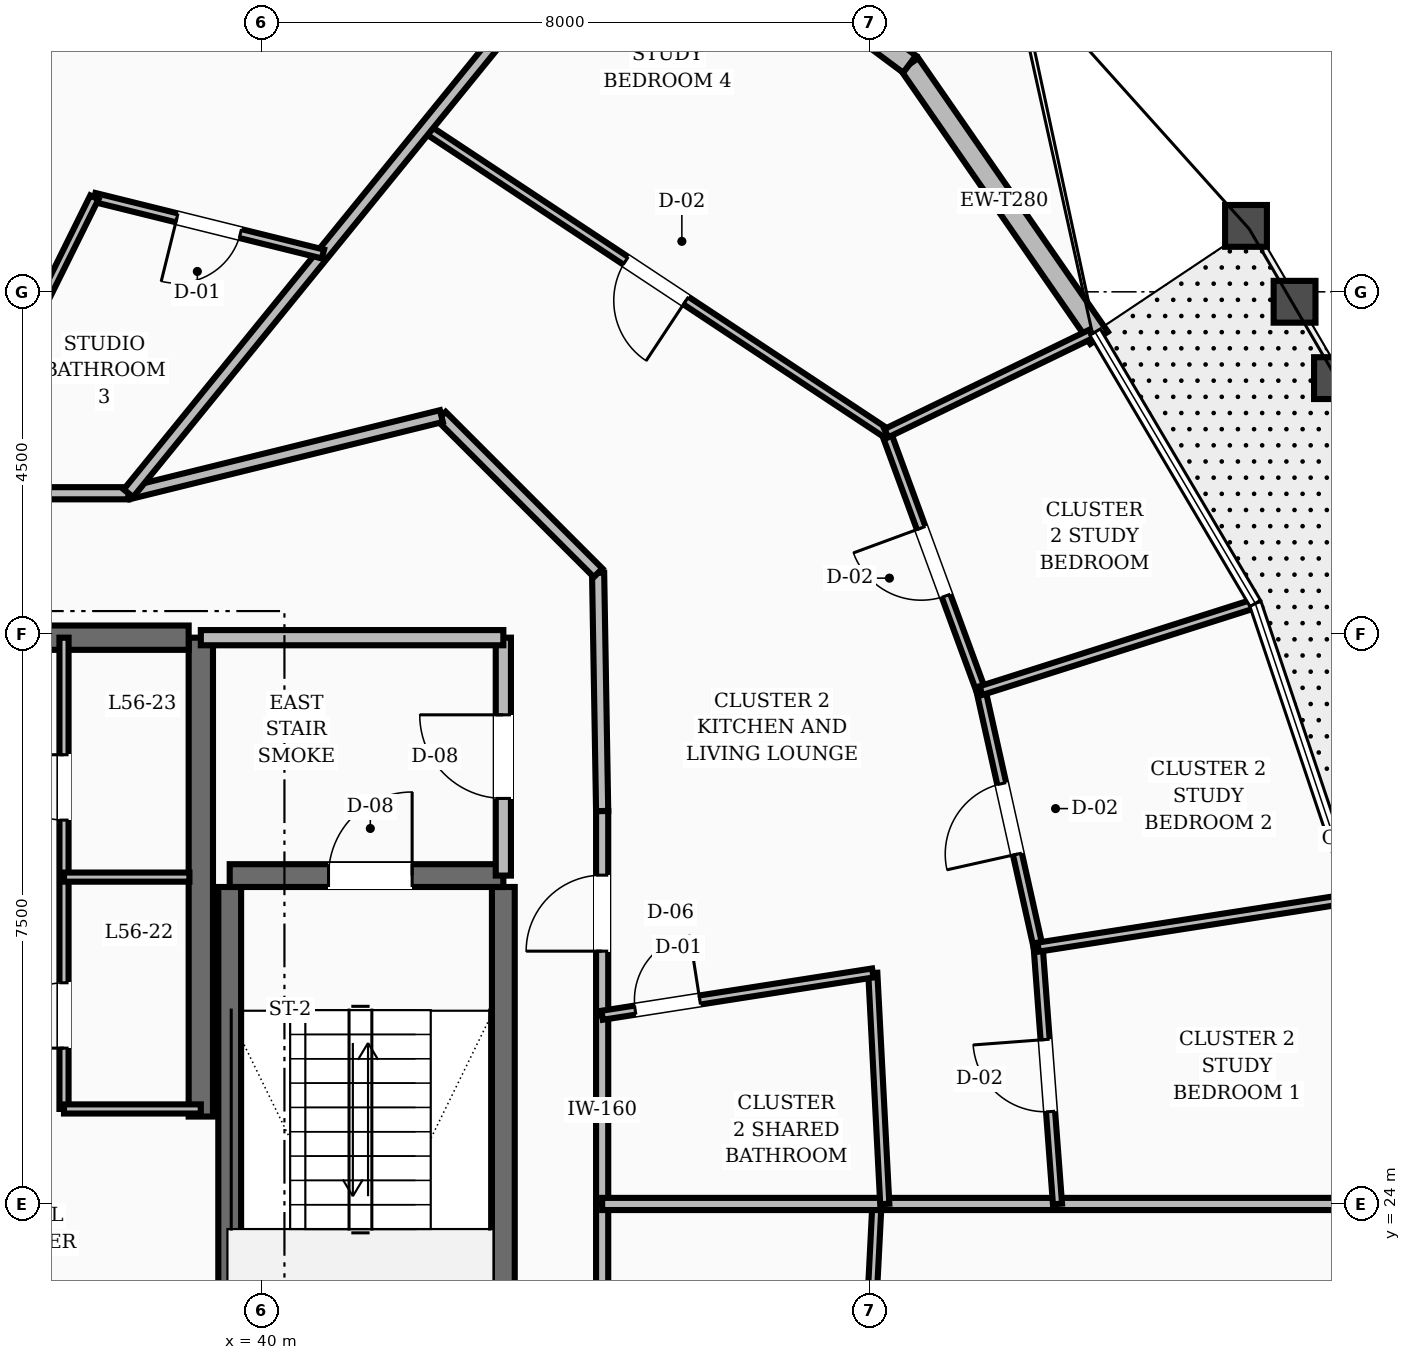
"""IFC4 building model, lengths in metres.
Left out: names, types, materials, properties, quantities, classifications, styles, units other than length and angle.
Written with IfcOpenShell. Run it as: python <this file> out.ifc"""

import sys

from ifc_helpers import new_model, si_unit, direction, frame, frame_2d, origin, place, context, subcontext, project, spatial, rectangle, extrude, element, fill, save


model = new_model("IFC4")
c1 = context("Model", 3, precision=1e-05, world=origin(), true_north=direction((0.0, 1.0)))
c2 = subcontext(c1, "Body", "Model", "MODEL_VIEW")
j1 = project(units=[si_unit("LENGTHUNIT", "METRE"), si_unit("PLANEANGLEUNIT", "RADIAN")], contexts=[c1])
p1 = place(None, origin())
s1 = spatial("IfcSite", under=j1, at=p1, CompositionType="ELEMENT")
p2 = place(p1, origin())
s2 = spatial("IfcBuilding", under=s1, at=p2, CompositionType="ELEMENT")
p3 = place(p2, frame((0.0, 0.0, 218.4)))
s3 = spatial("IfcBuildingStorey", under=s2, at=p3, CompositionType="ELEMENT", Elevation=218.4)
p4 = place(p3, frame((39.2, 25.15, 0.0), z_axis=(0.0, 0.0, 1.0), x_axis=(0.0, 1.0, 0.0)))
e1 = element("IfcWall", 1, at=p4, inside=s3, PredefinedType="SHEAR", context=c2, shape_type="SweptSolid", body=[
    extrude(rectangle(XDim=6.3, YDim=0.32, at=frame_2d((3.15, 0.0))), origin(), (0.0, 0.0, 1.0), 3.6),
])
p5 = place(p3, frame((35.8, 31.45, 0.0), z_axis=(0.0, 0.0, 1.0), x_axis=(1.0, 0.0, 0.0)))
e2 = element("IfcWall", 2, at=p5, inside=s3, PredefinedType="SHEAR", context=c2, shape_type="SweptSolid", body=[
    extrude(rectangle(XDim=3.24, YDim=0.32, at=frame_2d((1.62, 0.0))), origin(), (0.0, 0.0, 1.0), 3.6),
])
p6 = place(p5, frame((0.3, 0.0, 0.0)))
e3 = element("IfcOpeningElement", 3, at=p6, cuts=e2, PredefinedType="OPENING", context=c2, shape_type="SweptSolid", body=[
    extrude(rectangle(XDim=1.1, YDim=2.1, at=frame_2d((0.55, 1.05))), frame((0.0, 0.17, 0.0), z_axis=(0.0, -1.0, 0.0), x_axis=(1.0, 0.0, 0.0)), (0.0, 0.0, 1.0), 0.34),
])
for number, where, z_axis, x_axis in (
    (4, (43.18, 19.43, 0.0), (0.0, 0.0, 1.0), (0.0, 1.0, 0.0)),
    (5, (39.58, 19.43, 0.0), (0.0, 0.0, 1.0), (0.0, 1.0, 0.0)),
):
    element("IfcWall", number, at=place(p3, frame(where, z_axis=z_axis, x_axis=x_axis)), inside=s3, PredefinedType="SHEAR", context=c2, shape_type="SweptSolid", body=[
        extrude(rectangle(XDim=8.74, YDim=0.3, at=frame_2d((4.37, 0.0))), origin(), (0.0, 0.0, 1.0), 3.6),
    ])
p7 = place(p3, frame((39.58, 28.32, 0.0), z_axis=(0.0, 0.0, 1.0), x_axis=(1.0, 0.0, 0.0)))
e6 = element("IfcWall", 6, at=p7, inside=s3, PredefinedType="SHEAR", context=c2, shape_type="SweptSolid", body=[
    extrude(rectangle(XDim=3.6, YDim=0.3, at=frame_2d((1.8, 0.0))), origin(), (0.0, 0.0, 1.0), 3.6),
])
p8 = place(p7, frame((1.3, 0.0, 0.0)))
e7 = element("IfcOpeningElement", 7, at=p8, cuts=e6, PredefinedType="OPENING", context=c2, shape_type="SweptSolid", body=[
    extrude(rectangle(XDim=1.1, YDim=2.1, at=frame_2d((0.55, 1.05))), frame((0.0, 0.16, 0.0), z_axis=(0.0, -1.0, 0.0), x_axis=(1.0, 0.0, 0.0)), (0.0, 0.0, 1.0), 0.32),
])
p9 = place(p3, frame((51.017, 35.395, 0.0), z_axis=(0.0, 0.0, 1.0), x_axis=(-0.569267957894, 0.822152049267, 0.0)))
e8 = element("IfcWall", 8, at=p9, inside=s3, PredefinedType="STANDARD", context=c2, shape_type="SweptSolid", body=[
    extrude(rectangle(XDim=4.379, YDim=0.28, at=frame_2d((2.189, 0.0))), origin(), (0.0, 0.0, 1.0), 2.88),
])
p10 = place(p3, frame((48.524, 38.995, 0.0), z_axis=(0.0, 0.0, 1.0), x_axis=(-0.802005914902, 0.597316090912, 0.0)))
e9 = element("IfcWall", 9, at=p10, inside=s3, PredefinedType="STANDARD", context=c2, shape_type="SweptSolid", body=[
    extrude(rectangle(XDim=4.416, YDim=0.28, at=frame_2d((2.208, 0.0))), origin(), (0.0, 0.0, 1.0), 2.88),
])
p11 = place(p10, frame((0.608, 0.0, 0.8)))
e10 = element("IfcOpeningElement", 10, at=p11, cuts=e9, PredefinedType="OPENING", context=c2, shape_type="SweptSolid", body=[
    extrude(rectangle(XDim=3.2, YDim=1.65, at=frame_2d((1.6, 0.825))), frame((0.0, 0.15, 0.0), z_axis=(0.0, -1.0, 0.0), x_axis=(1.0, 0.0, 0.0)), (0.0, 0.0, 1.0), 0.3),
])
p12 = place(p3, frame((43.18, 28.32, 0.0), z_axis=(0.0, 0.0, 1.0), x_axis=(0.0, 1.0, 0.0)))
e11 = element("IfcWall", 11, at=p12, inside=s3, PredefinedType="SOLIDWALL", context=c2, shape_type="SweptSolid", body=[
    extrude(rectangle(XDim=3.13, YDim=0.2, at=frame_2d((1.565, 0.0))), origin(), (0.0, 0.0, 1.0), 2.87),
])
p13 = place(p12, frame((1.015, 0.0, 0.0)))
e12 = element("IfcOpeningElement", 12, at=p13, cuts=e11, PredefinedType="OPENING", context=c2, shape_type="SweptSolid", body=[
    extrude(rectangle(XDim=1.1, YDim=2.1, at=frame_2d((0.55, 1.05))), frame((0.0, 0.11, 0.0), z_axis=(0.0, -1.0, 0.0), x_axis=(1.0, 0.0, 0.0)), (0.0, 0.0, 1.0), 0.22),
])
p14 = place(p3, frame((39.2, 31.45, 0.0), z_axis=(0.0, 0.0, 1.0), x_axis=(1.0, 0.0, 0.0)))
e13 = element("IfcWall", 13, at=p14, inside=s3, PredefinedType="SOLIDWALL", context=c2, shape_type="SweptSolid", body=[
    extrude(rectangle(XDim=3.98, YDim=0.2, at=frame_2d((1.99, 0.0))), origin(), (0.0, 0.0, 1.0), 2.87),
])
p15 = place(p3, frame((37.4, 25.25, 0.0), z_axis=(0.0, 0.0, 1.0), x_axis=(0.0, 1.0, 0.0)))
e14 = element("IfcWall", 14, at=p15, inside=s3, PredefinedType="PARTITIONING", context=c2, shape_type="SweptSolid", body=[
    extrude(rectangle(XDim=6.2, YDim=0.12, at=frame_2d((3.1, 0.0))), origin(), (0.0, 0.0, 1.0), 2.87),
])
p16 = place(p15, frame((0.8, 0.0, 0.0)))
e15 = element("IfcOpeningElement", 15, at=p16, cuts=e14, PredefinedType="OPENING", context=c2, shape_type="SweptSolid", body=[
    extrude(rectangle(XDim=0.86, YDim=2.1, at=frame_2d((0.43, 1.05))), frame((0.0, 0.07, 0.0), z_axis=(0.0, -1.0, 0.0), x_axis=(1.0, 0.0, 0.0)), (0.0, 0.0, 1.0), 0.14),
])
p17 = place(p15, frame((3.8, 0.0, 0.0)))
e16 = element("IfcOpeningElement", 16, at=p17, cuts=e14, PredefinedType="OPENING", context=c2, shape_type="SweptSolid", body=[
    extrude(rectangle(XDim=0.86, YDim=2.1, at=frame_2d((0.43, 1.05))), frame((0.0, 0.07, 0.0), z_axis=(0.0, -1.0, 0.0), x_axis=(1.0, 0.0, 0.0)), (0.0, 0.0, 1.0), 0.14),
])
p18 = place(p3, frame((37.4, 25.25, 0.0), z_axis=(0.0, 0.0, 1.0), x_axis=(1.0, 0.0, 0.0)))
e17 = element("IfcWall", 17, at=p18, inside=s3, PredefinedType="PARTITIONING", context=c2, shape_type="SweptSolid", body=[
    extrude(rectangle(XDim=1.8, YDim=0.12, at=frame_2d((0.9, 0.0))), origin(), (0.0, 0.0, 1.0), 2.87),
])
p19 = place(p3, frame((37.4, 28.3, 0.0), z_axis=(0.0, 0.0, 1.0), x_axis=(1.0, 0.0, 0.0)))
e18 = element("IfcWall", 18, at=p19, inside=s3, PredefinedType="PARTITIONING", context=c2, shape_type="SweptSolid", body=[
    extrude(rectangle(XDim=1.65, YDim=0.12, at=frame_2d((0.825, 0.0))), origin(), (0.0, 0.0, 1.0), 2.87),
])
p20 = place(p3, frame((44.48, 24.0, 0.0), z_axis=(0.0, 0.0, 1.0), x_axis=(0.0, 1.0, 0.0)))
e19 = element("IfcWall", 19, at=p20, inside=s3, PredefinedType="SOLIDWALL", context=c2, shape_type="SweptSolid", body=[
    extrude(rectangle(XDim=2.482, YDim=0.16, at=frame_2d((1.241, 0.0))), origin(), (0.0, 0.0, 1.0), 2.87),
])
p21 = place(p3, frame((44.48, 26.482, 0.0), z_axis=(0.0, 0.0, 1.0), x_axis=(0.0, 1.0, 0.0)))
e20 = element("IfcWall", 20, at=p21, inside=s3, PredefinedType="SOLIDWALL", context=c2, shape_type="SweptSolid", body=[
    extrude(rectangle(XDim=2.687, YDim=0.16, at=frame_2d((1.344, 0.0))), origin(), (0.0, 0.0, 1.0), 2.87),
])
p22 = place(p21, frame((0.844, 0.0, 0.0)))
e21 = element("IfcOpeningElement", 21, at=p22, cuts=e20, PredefinedType="OPENING", context=c2, shape_type="SweptSolid", body=[
    extrude(rectangle(XDim=1.0, YDim=2.1, at=frame_2d((0.5, 1.05))), frame((0.0, 0.09, 0.0), z_axis=(0.0, -1.0, 0.0), x_axis=(1.0, 0.0, 0.0)), (0.0, 0.0, 1.0), 0.18),
])
p23 = place(p3, frame((44.48, 29.169, 0.0), z_axis=(0.0, 0.0, 1.0), x_axis=(-0.016981035134, 0.999855811828, 0.0)))
e22 = element("IfcWall", 22, at=p23, inside=s3, PredefinedType="SOLIDWALL", context=c2, shape_type="SweptSolid", body=[
    extrude(rectangle(XDim=3.134, YDim=0.16, at=frame_2d((1.567, 0.0))), origin(), (0.0, 0.0, 1.0), 2.87),
])
p24 = place(p3, frame((44.427, 32.303, 0.0), z_axis=(0.0, 0.0, 1.0), x_axis=(-0.707106781187, 0.707106781187, 0.0)))
e23 = element("IfcWall", 23, at=p24, inside=s3, PredefinedType="SOLIDWALL", context=c2, shape_type="SweptSolid", body=[
    extrude(rectangle(XDim=2.916, YDim=0.16, at=frame_2d((1.458, 0.0))), origin(), (0.0, 0.0, 1.0), 2.87),
])
p25 = place(p3, frame((42.365, 34.365, 0.0), z_axis=(0.0, 0.0, 1.0), x_axis=(-0.970939799552, -0.239323850978, 0.0)))
e24 = element("IfcWall", 24, at=p25, inside=s3, PredefinedType="SOLIDWALL", context=c2, shape_type="SweptSolid", body=[
    extrude(rectangle(XDim=4.241, YDim=0.16, at=frame_2d((2.12, 0.0))), origin(), (0.0, 0.0, 1.0), 2.87),
])
p26 = place(p3, frame((38.248, 33.35, 0.0), z_axis=(0.0, 0.0, 1.0), x_axis=(-1.0, 0.0, 0.0)))
e25 = element("IfcWall", 25, at=p26, inside=s3, PredefinedType="SOLIDWALL", context=c2, shape_type="SweptSolid", body=[
    extrude(rectangle(XDim=2.375, YDim=0.16, at=frame_2d((1.188, 0.0))), origin(), (0.0, 0.0, 1.0), 2.87),
])
p27 = place(p3, frame((44.48, 21.518, 0.0), z_axis=(0.0, 0.0, 1.0), x_axis=(0.0, 1.0, 0.0)))
e26 = element("IfcWall", 26, at=p27, inside=s3, PredefinedType="SOLIDWALL", context=c2, shape_type="SweptSolid", body=[
    extrude(rectangle(XDim=2.482, YDim=0.16, at=frame_2d((1.241, 0.0))), origin(), (0.0, 0.0, 1.0), 2.87),
])
p28 = place(p3, frame((47.942, 20.977, 0.0), z_axis=(0.0, 0.0, 1.0), x_axis=(0.050645517022, 0.998716692364, 0.0)))
e27 = element("IfcWall", 27, at=p28, inside=s3, PredefinedType="PARTITIONING", context=c2, shape_type="SweptSolid", body=[
    extrude(rectangle(XDim=3.027, YDim=0.12, at=frame_2d((1.514, 0.0))), origin(), (0.0, 0.0, 1.0), 2.87),
])
p29 = place(p3, frame((44.48, 24.0, 0.0), z_axis=(0.0, 0.0, 1.0), x_axis=(1.0, 0.0, 0.0)))
e28 = element("IfcWall", 28, at=p29, inside=s3, PredefinedType="SOLIDWALL", context=c2, shape_type="SweptSolid", body=[
    extrude(rectangle(XDim=10.279, YDim=0.16, at=frame_2d((5.139, 0.0))), origin(), (0.0, 0.0, 1.0), 2.87),
])
p30 = place(p3, frame((48.198, 24.0, 0.0), z_axis=(0.0, 0.0, 1.0), x_axis=(-0.051830297727, 0.998655906826, 0.0)))
e29 = element("IfcWall", 29, at=p30, inside=s3, PredefinedType="PARTITIONING", context=c2, shape_type="SweptSolid", body=[
    extrude(rectangle(XDim=3.043, YDim=0.12, at=frame_2d((1.521, 0.0))), origin(), (0.0, 0.0, 1.0), 2.87),
])
p31 = place(p3, frame((44.48, 26.482, 0.0), z_axis=(0.0, 0.0, 1.0), x_axis=(0.988009450348, 0.154393413147, 0.0)))
e30 = element("IfcWall", 30, at=p31, inside=s3, PredefinedType="PARTITIONING", context=c2, shape_type="SweptSolid", body=[
    extrude(rectangle(XDim=3.604, YDim=0.12, at=frame_2d((1.802, 0.0))), origin(), (0.0, 0.0, 1.0), 2.87),
])
p32 = place(p31, frame((0.44, 0.0, 0.0)))
e31 = element("IfcOpeningElement", 31, at=p32, cuts=e30, PredefinedType="OPENING", context=c2, shape_type="SweptSolid", body=[
    extrude(rectangle(XDim=0.86, YDim=2.1, at=frame_2d((0.43, 1.05))), frame((0.0, 0.07, 0.0), z_axis=(0.0, -1.0, 0.0), x_axis=(1.0, 0.0, 0.0)), (0.0, 0.0, 1.0), 0.14),
])
p33 = place(p3, frame((50.471, 24.0, 0.0), z_axis=(0.0, 0.0, 1.0), x_axis=(-0.075076534755, 0.997177774486, 0.0)))
e32 = element("IfcWall", 32, at=p33, inside=s3, PredefinedType="PARTITIONING", context=c2, shape_type="SweptSolid", body=[
    extrude(rectangle(XDim=3.388, YDim=0.12, at=frame_2d((1.694, 0.0))), origin(), (0.0, 0.0, 1.0), 2.87),
])
p34 = place(p33, frame((1.219, 0.0, 0.0)))
e33 = element("IfcOpeningElement", 33, at=p34, cuts=e32, PredefinedType="OPENING", context=c2, shape_type="SweptSolid", body=[
    extrude(rectangle(XDim=0.95, YDim=2.1, at=frame_2d((0.475, 1.05))), frame((0.0, 0.07, 0.0), z_axis=(0.0, -1.0, 0.0), x_axis=(1.0, 0.0, 0.0)), (0.0, 0.0, 1.0), 0.14),
])
p35 = place(p3, frame((50.216, 27.379, 0.0), z_axis=(0.0, 0.0, 1.0), x_axis=(-0.217670485925, 0.976022315092, 0.0)))
e34 = element("IfcWall", 34, at=p35, inside=s3, PredefinedType="PARTITIONING", context=c2, shape_type="SweptSolid", body=[
    extrude(rectangle(XDim=3.458, YDim=0.12, at=frame_2d((1.729, 0.0))), origin(), (0.0, 0.0, 1.0), 2.87),
])
p36 = place(p35, frame((1.254, 0.0, 0.0)))
e35 = element("IfcOpeningElement", 35, at=p36, cuts=e34, PredefinedType="OPENING", context=c2, shape_type="SweptSolid", body=[
    extrude(rectangle(XDim=0.95, YDim=2.1, at=frame_2d((0.475, 1.05))), frame((0.0, 0.07, 0.0), z_axis=(0.0, -1.0, 0.0), x_axis=(1.0, 0.0, 0.0)), (0.0, 0.0, 1.0), 0.14),
])
p37 = place(p3, frame((50.216, 27.379, 0.0), z_axis=(0.0, 0.0, 1.0), x_axis=(0.988012313849, 0.154375087639, 0.0)))
e36 = element("IfcWall", 36, at=p37, inside=s3, PredefinedType="PARTITIONING", context=c2, shape_type="SweptSolid", body=[
    extrude(rectangle(XDim=4.155, YDim=0.12, at=frame_2d((2.077, 0.0))), origin(), (0.0, 0.0, 1.0), 2.87),
])
p38 = place(p3, frame((49.464, 30.754, 0.0), z_axis=(0.0, 0.0, 1.0), x_axis=(-0.345027950541, 0.938592410659, 0.0)))
e37 = element("IfcWall", 37, at=p38, inside=s3, PredefinedType="PARTITIONING", context=c2, shape_type="SweptSolid", body=[
    extrude(rectangle(XDim=3.608, YDim=0.12, at=frame_2d((1.804, 0.0))), origin(), (0.0, 0.0, 1.0), 2.87),
])
p39 = place(p38, frame((1.329, 0.0, 0.0)))
e38 = element("IfcOpeningElement", 38, at=p39, cuts=e37, PredefinedType="OPENING", context=c2, shape_type="SweptSolid", body=[
    extrude(rectangle(XDim=0.95, YDim=2.1, at=frame_2d((0.475, 1.05))), frame((0.0, 0.07, 0.0), z_axis=(0.0, -1.0, 0.0), x_axis=(1.0, 0.0, 0.0)), (0.0, 0.0, 1.0), 0.14),
])
p40 = place(p3, frame((49.464, 30.754, 0.0), z_axis=(0.0, 0.0, 1.0), x_axis=(0.953007258162, 0.302947463913, 0.0)))
e39 = element("IfcWall", 39, at=p40, inside=s3, PredefinedType="PARTITIONING", context=c2, shape_type="SweptSolid", body=[
    extrude(rectangle(XDim=3.737, YDim=0.12, at=frame_2d((1.868, 0.0))), origin(), (0.0, 0.0, 1.0), 2.87),
])
p41 = place(p3, frame((48.219, 34.14, 0.0), z_axis=(0.0, 0.0, 1.0), x_axis=(-0.833915165303, 0.551892649957, 0.0)))
e40 = element("IfcWall", 40, at=p41, inside=s3, PredefinedType="PARTITIONING", context=c2, shape_type="SweptSolid", body=[
    extrude(rectangle(XDim=7.272, YDim=0.12, at=frame_2d((3.636, 0.0))), origin(), (0.0, 0.0, 1.0), 2.87),
])
p42 = place(p41, frame((3.161, 0.0, 0.0)))
e41 = element("IfcOpeningElement", 41, at=p42, cuts=e40, PredefinedType="OPENING", context=c2, shape_type="SweptSolid", body=[
    extrude(rectangle(XDim=0.95, YDim=2.1, at=frame_2d((0.475, 1.05))), frame((0.0, 0.07, 0.0), z_axis=(0.0, -1.0, 0.0), x_axis=(1.0, 0.0, 0.0)), (0.0, 0.0, 1.0), 0.14),
])
p43 = place(p3, frame((48.219, 34.14, 0.0), z_axis=(0.0, 0.0, 1.0), x_axis=(0.899937935562, 0.436018018133, 0.0)))
e42 = element("IfcWall", 42, at=p43, inside=s3, PredefinedType="PARTITIONING", context=c2, shape_type="SweptSolid", body=[
    extrude(rectangle(XDim=3.001, YDim=0.12, at=frame_2d((1.5, 0.0))), origin(), (0.0, 0.0, 1.0), 2.87),
])
p44 = place(p3, frame((38.248, 33.35, 0.0), z_axis=(0.0, 0.0, 1.0), x_axis=(0.630915216518, 0.775851783246, 0.0)))
e43 = element("IfcWall", 43, at=p44, inside=s3, PredefinedType="SOLIDWALL", context=c2, shape_type="SweptSolid", body=[
    extrude(rectangle(XDim=10.625, YDim=0.16, at=frame_2d((5.313, 0.0))), origin(), (0.0, 0.0, 1.0), 2.87),
])
p45 = place(p3, frame((40.807, 36.497, 0.0), z_axis=(0.0, 0.0, 1.0), x_axis=(-0.970668626589, 0.240421332986, 0.0)))
e44 = element("IfcWall", 44, at=p45, inside=s3, PredefinedType="PARTITIONING", context=c2, shape_type="SweptSolid", body=[
    extrude(rectangle(XDim=3.098, YDim=0.12, at=frame_2d((1.549, 0.0))), origin(), (0.0, 0.0, 1.0), 2.87),
])
p46 = place(p45, frame((1.119, 0.0, 0.0)))
e45 = element("IfcOpeningElement", 45, at=p46, cuts=e44, PredefinedType="OPENING", context=c2, shape_type="SweptSolid", body=[
    extrude(rectangle(XDim=0.86, YDim=2.1, at=frame_2d((0.43, 1.05))), frame((0.0, 0.07, 0.0), z_axis=(0.0, -1.0, 0.0), x_axis=(1.0, 0.0, 0.0)), (0.0, 0.0, 1.0), 0.14),
])
p47 = place(p3, frame((35.873, 33.35, 0.0), z_axis=(0.0, 0.0, 1.0), x_axis=(0.443657211788, 0.896196562384, 0.0)))
e46 = element("IfcWall", 46, at=p47, inside=s3, PredefinedType="PARTITIONING", context=c2, shape_type="SweptSolid", body=[
    extrude(rectangle(XDim=4.343, YDim=0.12, at=frame_2d((2.171, 0.0))), origin(), (0.0, 0.0, 1.0), 2.87),
])
p48 = place(p8, origin())
e47 = element("IfcDoor", 47, at=p48, inside=s3, OperationType="SINGLE_SWING_RIGHT", PredefinedType="DOOR", context=c2, shape_type="SweptSolid", body=[
    extrude(rectangle(XDim=1.1, YDim=2.1, at=frame_2d((0.55, 1.05))), frame((0.0, 0.025, 0.0), z_axis=(0.0, -1.0, 0.0), x_axis=(1.0, 0.0, 0.0)), (0.0, 0.0, 1.0), 0.05),
])
fill(e7, e47)
p49 = place(p13, origin())
e48 = element("IfcDoor", 48, at=p49, inside=s3, OperationType="SINGLE_SWING_RIGHT", PredefinedType="DOOR", context=c2, shape_type="SweptSolid", body=[
    extrude(rectangle(XDim=1.1, YDim=2.1, at=frame_2d((0.55, 1.05))), frame((0.0, 0.025, 0.0), z_axis=(0.0, -1.0, 0.0), x_axis=(1.0, 0.0, 0.0)), (0.0, 0.0, 1.0), 0.05),
])
fill(e12, e48)
p50 = place(p16, origin())
e49 = element("IfcDoor", 49, at=p50, inside=s3, OperationType="SINGLE_SWING_LEFT", PredefinedType="DOOR", context=c2, shape_type="SweptSolid", body=[
    extrude(rectangle(XDim=0.86, YDim=2.1, at=frame_2d((0.43, 1.05))), frame((0.0, 0.025, 0.0), z_axis=(0.0, -1.0, 0.0), x_axis=(1.0, 0.0, 0.0)), (0.0, 0.0, 1.0), 0.05),
])
fill(e15, e49)
p51 = place(p17, origin())
e50 = element("IfcDoor", 50, at=p51, inside=s3, OperationType="SINGLE_SWING_RIGHT", PredefinedType="DOOR", context=c2, shape_type="SweptSolid", body=[
    extrude(rectangle(XDim=0.86, YDim=2.1, at=frame_2d((0.43, 1.05))), frame((0.0, 0.025, 0.0), z_axis=(0.0, -1.0, 0.0), x_axis=(1.0, 0.0, 0.0)), (0.0, 0.0, 1.0), 0.05),
])
fill(e16, e50)
p52 = place(p32, origin())
e51 = element("IfcDoor", 51, at=p52, inside=s3, OperationType="SINGLE_SWING_RIGHT", PredefinedType="DOOR", context=c2, shape_type="SweptSolid", body=[
    extrude(rectangle(XDim=0.86, YDim=2.1, at=frame_2d((0.43, 1.05))), frame((0.0, 0.025, 0.0), z_axis=(0.0, -1.0, 0.0), x_axis=(1.0, 0.0, 0.0)), (0.0, 0.0, 1.0), 0.05),
])
fill(e31, e51)
p53 = place(p22, origin())
e52 = element("IfcDoor", 52, at=p53, inside=s3, OperationType="SINGLE_SWING_LEFT", PredefinedType="DOOR", context=c2, shape_type="SweptSolid", body=[
    extrude(rectangle(XDim=1.0, YDim=2.1, at=frame_2d((0.5, 1.05))), frame((0.0, 0.025, 0.0), z_axis=(0.0, -1.0, 0.0), x_axis=(1.0, 0.0, 0.0)), (0.0, 0.0, 1.0), 0.05),
])
fill(e21, e52)
p54 = place(p34, origin())
e53 = element("IfcDoor", 53, at=p54, inside=s3, OperationType="SINGLE_SWING_RIGHT", PredefinedType="DOOR", context=c2, shape_type="SweptSolid", body=[
    extrude(rectangle(XDim=0.95, YDim=2.1, at=frame_2d((0.475, 1.05))), frame((0.0, 0.025, 0.0), z_axis=(0.0, -1.0, 0.0), x_axis=(1.0, 0.0, 0.0)), (0.0, 0.0, 1.0), 0.05),
])
fill(e33, e53)
p55 = place(p36, origin())
e54 = element("IfcDoor", 54, at=p55, inside=s3, OperationType="SINGLE_SWING_LEFT", PredefinedType="DOOR", context=c2, shape_type="SweptSolid", body=[
    extrude(rectangle(XDim=0.95, YDim=2.1, at=frame_2d((0.475, 1.05))), frame((0.0, 0.025, 0.0), z_axis=(0.0, -1.0, 0.0), x_axis=(1.0, 0.0, 0.0)), (0.0, 0.0, 1.0), 0.05),
])
fill(e35, e54)
p56 = place(p39, origin())
e55 = element("IfcDoor", 55, at=p56, inside=s3, OperationType="SINGLE_SWING_RIGHT", PredefinedType="DOOR", context=c2, shape_type="SweptSolid", body=[
    extrude(rectangle(XDim=0.95, YDim=2.1, at=frame_2d((0.475, 1.05))), frame((0.0, 0.025, 0.0), z_axis=(0.0, -1.0, 0.0), x_axis=(1.0, 0.0, 0.0)), (0.0, 0.0, 1.0), 0.05),
])
fill(e38, e55)
p57 = place(p42, origin())
e56 = element("IfcDoor", 56, at=p57, inside=s3, OperationType="SINGLE_SWING_LEFT", PredefinedType="DOOR", context=c2, shape_type="SweptSolid", body=[
    extrude(rectangle(XDim=0.95, YDim=2.1, at=frame_2d((0.475, 1.05))), frame((0.0, 0.025, 0.0), z_axis=(0.0, -1.0, 0.0), x_axis=(1.0, 0.0, 0.0)), (0.0, 0.0, 1.0), 0.05),
])
fill(e41, e56)
p58 = place(p46, origin())
e57 = element("IfcDoor", 57, at=p58, inside=s3, OperationType="SINGLE_SWING_RIGHT", PredefinedType="DOOR", context=c2, shape_type="SweptSolid", body=[
    extrude(rectangle(XDim=0.86, YDim=2.1, at=frame_2d((0.43, 1.05))), frame((0.0, 0.025, 0.0), z_axis=(0.0, -1.0, 0.0), x_axis=(1.0, 0.0, 0.0)), (0.0, 0.0, 1.0), 0.05),
])
fill(e45, e57)
save(model, sys.argv[1])
